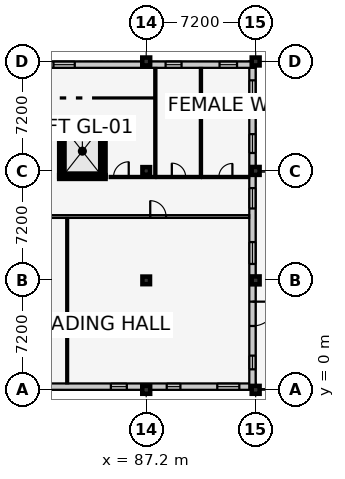
"""IFC4 building model, lengths in metres.
Left out: names, types, materials, properties, quantities, classifications, styles, units other than length and angle.
Written with IfcOpenShell. Run it as: python <this file> out.ifc"""

import sys

from ifc_helpers import new_model, si_unit, direction, frame, frame_2d, origin, origin_2d, place, context, subcontext, project, spatial, rectangle, extrude, element, fill, save


model = new_model("IFC4")
c1 = context("Model", 3, precision=1e-05, world=origin(), true_north=direction((0.0, 1.0)))
c2 = subcontext(c1, "Body", "Model", "MODEL_VIEW")
j1 = project(units=[si_unit("LENGTHUNIT", "METRE"), si_unit("PLANEANGLEUNIT", "RADIAN")], contexts=[c1])
p1 = place(None, origin())
s1 = spatial("IfcSite", under=j1, at=p1, CompositionType="ELEMENT")
p2 = place(p1, origin())
s2 = spatial("IfcBuilding", under=s1, at=p2, CompositionType="ELEMENT")
p3 = place(p2, frame((0.0, 0.0, 18.0)))
s3 = spatial("IfcBuildingStorey", under=s2, at=p3, CompositionType="ELEMENT", Elevation=18.0)
p4 = place(p3, frame((87.2, 0.0, 0.0), z_axis=(0.0, 0.0, 1.0), x_axis=(1.0, 0.0, 0.0)))
e1 = element("IfcColumn", 1, at=p4, inside=s3, PredefinedType="COLUMN", context=c2, shape_type="SweptSolid", body=[
    extrude(rectangle(XDim=0.52, YDim=0.52, at=origin_2d()), origin(), (0.0, 0.0, 1.0), 3.9),
])
for number, where, z_axis, x_axis in (
    (2, (87.2, 7.2, 0.0), (0.0, 0.0, 1.0), (1.0, 0.0, 0.0)),
    (3, (87.2, 14.4, 0.0), (0.0, 0.0, 1.0), (1.0, 0.0, 0.0)),
):
    element("IfcColumn", number, at=place(p3, frame(where, z_axis=z_axis, x_axis=x_axis)), inside=s3, PredefinedType="COLUMN", context=c2, shape_type="SweptSolid", body=[
        extrude(rectangle(XDim=0.5, YDim=0.5, at=origin_2d()), origin(), (0.0, 0.0, 1.0), 3.9),
    ])
for number, where, z_axis, x_axis in (
    (4, (87.2, 21.6, 0.0), (0.0, 0.0, 1.0), (1.0, 0.0, 0.0)),
    (5, (94.4, 0.0, 0.0), (0.0, 0.0, 1.0), (1.0, 0.0, 0.0)),
    (6, (94.4, 7.2, 0.0), (0.0, 0.0, 1.0), (1.0, 0.0, 0.0)),
    (7, (94.4, 14.4, 0.0), (0.0, 0.0, 1.0), (1.0, 0.0, 0.0)),
    (8, (94.4, 21.6, 0.0), (0.0, 0.0, 1.0), (1.0, 0.0, 0.0)),
):
    element("IfcColumn", number, at=place(p3, frame(where, z_axis=z_axis, x_axis=x_axis)), inside=s3, PredefinedType="COLUMN", context=c2, shape_type="SweptSolid", body=[
        extrude(rectangle(XDim=0.52, YDim=0.52, at=origin_2d()), origin(), (0.0, 0.0, 1.0), 3.9),
    ])
p5 = place(p3, frame((94.4, 0.21, 0.0), z_axis=(0.0, 0.0, 1.0), x_axis=(-1.0, 0.0, 0.0)))
e9 = element("IfcWall", 9, at=p5, inside=s3, PredefinedType="SOLIDWALL", context=c2, shape_type="SweptSolid", body=[
    extrude(rectangle(XDim=28.8, YDim=0.42, at=frame_2d((14.4, 0.0))), origin(), (0.0, 0.0, 1.0), 2.955),
])
p6 = place(p5, frame((1.075, 0.0, 0.9)))
e10 = element("IfcOpeningElement", 10, at=p6, cuts=e9, PredefinedType="OPENING", context=c2, shape_type="SweptSolid", body=[
    extrude(rectangle(XDim=1.45, YDim=1.45, at=frame_2d((0.725, 0.725))), frame((0.0, 0.222, 0.0), z_axis=(0.0, -1.0, 0.0), x_axis=(1.0, 0.0, 0.0)), (0.0, 0.0, 1.0), 0.444),
])
p7 = place(p5, frame((4.95, 0.0, 0.9)))
e11 = element("IfcOpeningElement", 11, at=p7, cuts=e9, PredefinedType="OPENING", context=c2, shape_type="SweptSolid", body=[
    extrude(rectangle(XDim=0.9, YDim=1.6, at=frame_2d((0.45, 0.8))), frame((0.0, 0.222, 0.0), z_axis=(0.0, -1.0, 0.0), x_axis=(1.0, 0.0, 0.0)), (0.0, 0.0, 1.0), 0.444),
])
p8 = place(p5, frame((8.475, 0.0, 0.9)))
e12 = element("IfcOpeningElement", 12, at=p8, cuts=e9, PredefinedType="OPENING", context=c2, shape_type="SweptSolid", body=[
    extrude(rectangle(XDim=1.05, YDim=1.6, at=frame_2d((0.525, 0.8))), frame((0.0, 0.222, 0.0), z_axis=(0.0, -1.0, 0.0), x_axis=(1.0, 0.0, 0.0)), (0.0, 0.0, 1.0), 0.444),
])
p9 = place(p5, frame((15.575, 0.0, 0.9)))
e13 = element("IfcOpeningElement", 13, at=p9, cuts=e9, PredefinedType="OPENING", context=c2, shape_type="SweptSolid", body=[
    extrude(rectangle(XDim=1.25, YDim=1.6, at=frame_2d((0.625, 0.8))), frame((0.0, 0.222, 0.0), z_axis=(0.0, -1.0, 0.0), x_axis=(1.0, 0.0, 0.0)), (0.0, 0.0, 1.0), 0.444),
])
p10 = place(p5, frame((19.11, 0.0, 0.9)))
e14 = element("IfcOpeningElement", 14, at=p10, cuts=e9, PredefinedType="OPENING", context=c2, shape_type="SweptSolid", body=[
    extrude(rectangle(XDim=1.38, YDim=1.6, at=frame_2d((0.69, 0.8))), frame((0.0, 0.222, 0.0), z_axis=(0.0, -1.0, 0.0), x_axis=(1.0, 0.0, 0.0)), (0.0, 0.0, 1.0), 0.444),
])
p11 = place(p5, frame((22.65, 0.0, 0.9)))
e15 = element("IfcOpeningElement", 15, at=p11, cuts=e9, PredefinedType="OPENING", context=c2, shape_type="SweptSolid", body=[
    extrude(rectangle(XDim=1.5, YDim=1.6, at=frame_2d((0.75, 0.8))), frame((0.0, 0.222, 0.0), z_axis=(0.0, -1.0, 0.0), x_axis=(1.0, 0.0, 0.0)), (0.0, 0.0, 1.0), 0.444),
])
p12 = place(p5, frame((26.5, 0.0, 0.9)))
e16 = element("IfcOpeningElement", 16, at=p12, cuts=e9, PredefinedType="OPENING", context=c2, shape_type="SweptSolid", body=[
    extrude(rectangle(XDim=1.0, YDim=1.75, at=frame_2d((0.5, 0.875))), frame((0.0, 0.222, 0.0), z_axis=(0.0, -1.0, 0.0), x_axis=(1.0, 0.0, 0.0)), (0.0, 0.0, 1.0), 0.444),
])
p13 = place(p3, frame((94.19, 21.6, 0.0), z_axis=(0.0, 0.0, 1.0), x_axis=(0.0, -1.0, 0.0)))
e17 = element("IfcWall", 17, at=p13, inside=s3, PredefinedType="SOLIDWALL", context=c2, shape_type="SweptSolid", body=[
    extrude(rectangle(XDim=21.6, YDim=0.42, at=frame_2d((10.8, 0.0))), origin(), (0.0, 0.0, 1.0), 3.055),
])
p14 = place(p13, frame((15.8, 0.0, 0.0)))
e18 = element("IfcOpeningElement", 18, at=p14, cuts=e17, PredefinedType="OPENING", context=c2, shape_type="SweptSolid", body=[
    extrude(rectangle(XDim=1.6, YDim=2.2, at=frame_2d((0.8, 1.1))), frame((0.0, 0.222, 0.0), z_axis=(0.0, -1.0, 0.0), x_axis=(1.0, 0.0, 0.0)), (0.0, 0.0, 1.0), 0.444),
])
p15 = place(p13, frame((1.24, 0.0, 0.9)))
e19 = element("IfcOpeningElement", 19, at=p15, cuts=e17, PredefinedType="OPENING", context=c2, shape_type="SweptSolid", body=[
    extrude(rectangle(XDim=1.12, YDim=1.75, at=frame_2d((0.56, 0.875))), frame((0.0, 0.222, 0.0), z_axis=(0.0, -1.0, 0.0), x_axis=(1.0, 0.0, 0.0)), (0.0, 0.0, 1.0), 0.444),
])
p16 = place(p13, frame((4.78, 0.0, 0.9)))
e20 = element("IfcOpeningElement", 20, at=p16, cuts=e17, PredefinedType="OPENING", context=c2, shape_type="SweptSolid", body=[
    extrude(rectangle(XDim=1.24, YDim=1.75, at=frame_2d((0.62, 0.875))), frame((0.0, 0.222, 0.0), z_axis=(0.0, -1.0, 0.0), x_axis=(1.0, 0.0, 0.0)), (0.0, 0.0, 1.0), 0.444),
])
p17 = place(p13, frame((8.33, 0.0, 0.9)))
e21 = element("IfcOpeningElement", 21, at=p17, cuts=e17, PredefinedType="OPENING", context=c2, shape_type="SweptSolid", body=[
    extrude(rectangle(XDim=1.34, YDim=1.75, at=frame_2d((0.67, 0.875))), frame((0.0, 0.222, 0.0), z_axis=(0.0, -1.0, 0.0), x_axis=(1.0, 0.0, 0.0)), (0.0, 0.0, 1.0), 0.444),
])
p18 = place(p13, frame((11.88, 0.0, 0.9)))
e22 = element("IfcOpeningElement", 22, at=p18, cuts=e17, PredefinedType="OPENING", context=c2, shape_type="SweptSolid", body=[
    extrude(rectangle(XDim=1.44, YDim=1.75, at=frame_2d((0.72, 0.875))), frame((0.0, 0.222, 0.0), z_axis=(0.0, -1.0, 0.0), x_axis=(1.0, 0.0, 0.0)), (0.0, 0.0, 1.0), 0.444),
])
p19 = place(p13, frame((19.35, 0.0, 0.9)))
e23 = element("IfcOpeningElement", 23, at=p19, cuts=e17, PredefinedType="OPENING", context=c2, shape_type="SweptSolid", body=[
    extrude(rectangle(XDim=0.9, YDim=1.35, at=frame_2d((0.45, 0.675))), frame((0.0, 0.222, 0.0), z_axis=(0.0, -1.0, 0.0), x_axis=(1.0, 0.0, 0.0)), (0.0, 0.0, 1.0), 0.444),
])
p20 = place(p3, frame((65.6, 21.39, 0.0), z_axis=(0.0, 0.0, 1.0), x_axis=(1.0, 0.0, 0.0)))
e24 = element("IfcWall", 24, at=p20, inside=s3, PredefinedType="SOLIDWALL", context=c2, shape_type="SweptSolid", body=[
    extrude(rectangle(XDim=28.8, YDim=0.42, at=frame_2d((14.4, 0.0))), origin(), (0.0, 0.0, 1.0), 2.955),
])
p21 = place(p20, frame((1.3, 0.0, 0.9)))
e25 = element("IfcOpeningElement", 25, at=p21, cuts=e24, PredefinedType="OPENING", context=c2, shape_type="SweptSolid", body=[
    extrude(rectangle(XDim=1.0, YDim=1.35, at=frame_2d((0.5, 0.675))), frame((0.0, 0.222, 0.0), z_axis=(0.0, -1.0, 0.0), x_axis=(1.0, 0.0, 0.0)), (0.0, 0.0, 1.0), 0.444),
])
p22 = place(p20, frame((8.4, 0.0, 0.9)))
e26 = element("IfcOpeningElement", 26, at=p22, cuts=e24, PredefinedType="OPENING", context=c2, shape_type="SweptSolid", body=[
    extrude(rectangle(XDim=1.2, YDim=1.35, at=frame_2d((0.6, 0.675))), frame((0.0, 0.222, 0.0), z_axis=(0.0, -1.0, 0.0), x_axis=(1.0, 0.0, 0.0)), (0.0, 0.0, 1.0), 0.444),
])
p23 = place(p20, frame((11.95, 0.0, 0.9)))
e27 = element("IfcOpeningElement", 27, at=p23, cuts=e24, PredefinedType="OPENING", context=c2, shape_type="SweptSolid", body=[
    extrude(rectangle(XDim=1.3, YDim=1.35, at=frame_2d((0.65, 0.675))), frame((0.0, 0.222, 0.0), z_axis=(0.0, -1.0, 0.0), x_axis=(1.0, 0.0, 0.0)), (0.0, 0.0, 1.0), 0.444),
])
p24 = place(p20, frame((15.5, 0.0, 0.9)))
e28 = element("IfcOpeningElement", 28, at=p24, cuts=e24, PredefinedType="OPENING", context=c2, shape_type="SweptSolid", body=[
    extrude(rectangle(XDim=1.4, YDim=1.35, at=frame_2d((0.7, 0.675))), frame((0.0, 0.222, 0.0), z_axis=(0.0, -1.0, 0.0), x_axis=(1.0, 0.0, 0.0)), (0.0, 0.0, 1.0), 0.444),
])
p25 = place(p20, frame((22.875, 0.0, 0.9)))
e29 = element("IfcOpeningElement", 29, at=p25, cuts=e24, PredefinedType="OPENING", context=c2, shape_type="SweptSolid", body=[
    extrude(rectangle(XDim=1.05, YDim=1.45, at=frame_2d((0.525, 0.725))), frame((0.0, 0.222, 0.0), z_axis=(0.0, -1.0, 0.0), x_axis=(1.0, 0.0, 0.0)), (0.0, 0.0, 1.0), 0.444),
])
p26 = place(p20, frame((26.425, 0.0, 0.9)))
e30 = element("IfcOpeningElement", 30, at=p26, cuts=e24, PredefinedType="OPENING", context=c2, shape_type="SweptSolid", body=[
    extrude(rectangle(XDim=1.15, YDim=1.45, at=frame_2d((0.575, 0.725))), frame((0.0, 0.222, 0.0), z_axis=(0.0, -1.0, 0.0), x_axis=(1.0, 0.0, 0.0)), (0.0, 0.0, 1.0), 0.444),
])
p27 = place(p3, frame((81.475, 14.0, 0.0), z_axis=(0.0, 0.0, 1.0), x_axis=(1.0, 0.0, 0.0)))
e31 = element("IfcWall", 31, at=p27, inside=s3, PredefinedType="SHEAR", context=c2, shape_type="SweptSolid", body=[
    extrude(rectangle(XDim=3.05, YDim=0.25, at=frame_2d((1.525, 0.0))), origin(), (0.0, 0.0, 1.0), 3.66),
])
p28 = place(p27, frame((0.725, 0.0, 0.0)))
e32 = element("IfcOpeningElement", 32, at=p28, cuts=e31, PredefinedType="OPENING", context=c2, shape_type="SweptSolid", body=[
    extrude(rectangle(XDim=1.6, YDim=2.3, at=frame_2d((0.8, 1.15))), frame((0.0, 0.137, 0.0), z_axis=(0.0, -1.0, 0.0), x_axis=(1.0, 0.0, 0.0)), (0.0, 0.0, 1.0), 0.274),
])
p29 = place(p3, frame((84.525, 17.4, 0.0), z_axis=(0.0, 0.0, 1.0), x_axis=(-1.0, 0.0, 0.0)))
e33 = element("IfcWall", 33, at=p29, inside=s3, PredefinedType="SHEAR", context=c2, shape_type="SweptSolid", body=[
    extrude(rectangle(XDim=3.05, YDim=0.25, at=frame_2d((1.525, 0.0))), origin(), (0.0, 0.0, 1.0), 3.66),
])
for number, where, z_axis, x_axis in (
    (34, (81.6, 17.4, 0.0), (0.0, 0.0, 1.0), (0.0, -1.0, 0.0)),
    (35, (84.4, 14.0, 0.0), (0.0, 0.0, 1.0), (0.0, 1.0, 0.0)),
):
    element("IfcWall", number, at=place(p3, frame(where, z_axis=z_axis, x_axis=x_axis)), inside=s3, PredefinedType="SHEAR", context=c2, shape_type="SweptSolid", body=[
        extrude(rectangle(XDim=3.4, YDim=0.25, at=frame_2d((1.7, 0.0))), origin(), (0.0, 0.0, 1.0), 3.66),
    ])
p30 = place(p3, frame((66.03, 11.4, 0.0), z_axis=(0.0, 0.0, 1.0), x_axis=(1.0, 0.0, 0.0)))
e36 = element("IfcWall", 36, at=p30, inside=s3, PredefinedType="PARTITIONING", context=c2, shape_type="SweptSolid", body=[
    extrude(rectangle(XDim=27.94, YDim=0.18, at=frame_2d((13.97, 0.0))), origin(), (0.0, 0.0, 1.0), 3.66),
])
p31 = place(p30, frame((7.445, 0.0, 0.0)))
e37 = element("IfcOpeningElement", 37, at=p31, cuts=e36, PredefinedType="OPENING", context=c2, shape_type="SweptSolid", body=[
    extrude(rectangle(XDim=1.08, YDim=2.15, at=frame_2d((0.54, 1.075))), frame((0.0, 0.102, 0.0), z_axis=(0.0, -1.0, 0.0), x_axis=(1.0, 0.0, 0.0)), (0.0, 0.0, 1.0), 0.204),
])
p32 = place(p30, frame((21.435, 0.0, 0.0)))
e38 = element("IfcOpeningElement", 38, at=p32, cuts=e36, PredefinedType="OPENING", context=c2, shape_type="SweptSolid", body=[
    extrude(rectangle(XDim=1.04, YDim=2.15, at=frame_2d((0.52, 1.075))), frame((0.0, 0.102, 0.0), z_axis=(0.0, -1.0, 0.0), x_axis=(1.0, 0.0, 0.0)), (0.0, 0.0, 1.0), 0.204),
])
p33 = place(p3, frame((82.0, 0.43, 0.0), z_axis=(0.0, 0.0, 1.0), x_axis=(0.0, 1.0, 0.0)))
e39 = element("IfcWall", 39, at=p33, inside=s3, PredefinedType="PARTITIONING", context=c2, shape_type="SweptSolid", body=[
    extrude(rectangle(XDim=10.87, YDim=0.125, at=frame_2d((5.435, 0.0))), origin(), (0.0, 0.0, 1.0), 3.66),
])
p34 = place(p3, frame((84.8, 14.0, 0.0), z_axis=(0.0, 0.0, 1.0), x_axis=(1.0, 0.0, 0.0)))
e40 = element("IfcWall", 40, at=p34, inside=s3, PredefinedType="PARTITIONING", context=c2, shape_type="SweptSolid", body=[
    extrude(rectangle(XDim=3.0, YDim=0.14, at=frame_2d((1.5, 0.0))), origin(), (0.0, 0.0, 1.0), 3.66),
])
p35 = place(p34, frame((0.25, 0.0, 0.0)))
e41 = element("IfcOpeningElement", 41, at=p35, cuts=e40, PredefinedType="OPENING", context=c2, shape_type="SweptSolid", body=[
    extrude(rectangle(XDim=1.0, YDim=2.1, at=frame_2d((0.5, 1.05))), frame((0.0, 0.082, 0.0), z_axis=(0.0, -1.0, 0.0), x_axis=(1.0, 0.0, 0.0)), (0.0, 0.0, 1.0), 0.164),
])
p36 = place(p3, frame((87.8, 14.08, 0.0), z_axis=(0.0, 0.0, 1.0), x_axis=(0.0, 1.0, 0.0)))
e42 = element("IfcWall", 42, at=p36, inside=s3, PredefinedType="PARTITIONING", context=c2, shape_type="SweptSolid", body=[
    extrude(rectangle(XDim=7.09, YDim=0.14, at=frame_2d((3.545, 0.0))), origin(), (0.0, 0.0, 1.0), 3.66),
])
p37 = place(p3, frame((87.88, 14.0, 0.0), z_axis=(0.0, 0.0, 1.0), x_axis=(1.0, 0.0, 0.0)))
e43 = element("IfcWall", 43, at=p37, inside=s3, PredefinedType="PARTITIONING", context=c2, shape_type="SweptSolid", body=[
    extrude(rectangle(XDim=2.92, YDim=0.14, at=frame_2d((1.46, 0.0))), origin(), (0.0, 0.0, 1.0), 3.66),
])
p38 = place(p37, frame((1.005, 0.0, 0.0)))
e44 = element("IfcOpeningElement", 44, at=p38, cuts=e43, PredefinedType="OPENING", context=c2, shape_type="SweptSolid", body=[
    extrude(rectangle(XDim=0.91, YDim=2.06, at=frame_2d((0.455, 1.03))), frame((0.0, 0.082, 0.0), z_axis=(0.0, -1.0, 0.0), x_axis=(1.0, 0.0, 0.0)), (0.0, 0.0, 1.0), 0.164),
])
p39 = place(p3, frame((90.8, 14.08, 0.0), z_axis=(0.0, 0.0, 1.0), x_axis=(0.0, 1.0, 0.0)))
e45 = element("IfcWall", 45, at=p39, inside=s3, PredefinedType="PARTITIONING", context=c2, shape_type="SweptSolid", body=[
    extrude(rectangle(XDim=7.09, YDim=0.14, at=frame_2d((3.545, 0.0))), origin(), (0.0, 0.0, 1.0), 3.275),
])
p40 = place(p3, frame((90.88, 14.0, 0.0), z_axis=(0.0, 0.0, 1.0), x_axis=(1.0, 0.0, 0.0)))
e46 = element("IfcWall", 46, at=p40, inside=s3, PredefinedType="PARTITIONING", context=c2, shape_type="SweptSolid", body=[
    extrude(rectangle(XDim=3.09, YDim=0.14, at=frame_2d((1.545, 0.0))), origin(), (0.0, 0.0, 1.0), 3.66),
])
p41 = place(p40, frame((1.1, 0.0, 0.0)))
e47 = element("IfcOpeningElement", 47, at=p41, cuts=e46, PredefinedType="OPENING", context=c2, shape_type="SweptSolid", body=[
    extrude(rectangle(XDim=0.89, YDim=2.05, at=frame_2d((0.445, 1.025))), frame((0.0, 0.082, 0.0), z_axis=(0.0, -1.0, 0.0), x_axis=(1.0, 0.0, 0.0)), (0.0, 0.0, 1.0), 0.164),
])
p42 = place(p6, origin())
e48 = element("IfcWindow", 48, at=p42, inside=s3, PartitioningType="SINGLE_PANEL", PredefinedType="WINDOW", context=c2, shape_type="SweptSolid", body=[
    extrude(rectangle(XDim=1.45, YDim=1.45, at=frame_2d((0.725, 0.725))), frame((0.0, 0.03, 0.0), z_axis=(0.0, -1.0, 0.0), x_axis=(1.0, 0.0, 0.0)), (0.0, 0.0, 1.0), 0.06),
])
fill(e10, e48)
p43 = place(p7, origin())
e49 = element("IfcWindow", 49, at=p43, inside=s3, PartitioningType="SINGLE_PANEL", PredefinedType="WINDOW", context=c2, shape_type="SweptSolid", body=[
    extrude(rectangle(XDim=0.9, YDim=1.6, at=frame_2d((0.45, 0.8))), frame((0.0, 0.03, 0.0), z_axis=(0.0, -1.0, 0.0), x_axis=(1.0, 0.0, 0.0)), (0.0, 0.0, 1.0), 0.06),
])
fill(e11, e49)
p44 = place(p8, origin())
e50 = element("IfcWindow", 50, at=p44, inside=s3, PartitioningType="SINGLE_PANEL", PredefinedType="WINDOW", context=c2, shape_type="SweptSolid", body=[
    extrude(rectangle(XDim=1.05, YDim=1.6, at=frame_2d((0.525, 0.8))), frame((0.0, 0.03, 0.0), z_axis=(0.0, -1.0, 0.0), x_axis=(1.0, 0.0, 0.0)), (0.0, 0.0, 1.0), 0.06),
])
fill(e12, e50)
p45 = place(p14, origin())
e51 = element("IfcDoor", 51, at=p45, inside=s3, OperationType="SINGLE_SWING_LEFT", PredefinedType="DOOR", context=c2, shape_type="SweptSolid", body=[
    extrude(rectangle(XDim=1.6, YDim=2.2, at=frame_2d((0.8, 1.1))), frame((0.0, 0.025, 0.0), z_axis=(0.0, -1.0, 0.0), x_axis=(1.0, 0.0, 0.0)), (0.0, 0.0, 1.0), 0.05),
])
fill(e18, e51)
p46 = place(p15, origin())
e52 = element("IfcWindow", 52, at=p46, inside=s3, PartitioningType="SINGLE_PANEL", PredefinedType="WINDOW", context=c2, shape_type="SweptSolid", body=[
    extrude(rectangle(XDim=1.12, YDim=1.75, at=frame_2d((0.56, 0.875))), frame((0.0, 0.03, 0.0), z_axis=(0.0, -1.0, 0.0), x_axis=(1.0, 0.0, 0.0)), (0.0, 0.0, 1.0), 0.06),
])
fill(e19, e52)
p47 = place(p16, origin())
e53 = element("IfcWindow", 53, at=p47, inside=s3, PartitioningType="SINGLE_PANEL", PredefinedType="WINDOW", context=c2, shape_type="SweptSolid", body=[
    extrude(rectangle(XDim=1.24, YDim=1.75, at=frame_2d((0.62, 0.875))), frame((0.0, 0.03, 0.0), z_axis=(0.0, -1.0, 0.0), x_axis=(1.0, 0.0, 0.0)), (0.0, 0.0, 1.0), 0.06),
])
fill(e20, e53)
p48 = place(p17, origin())
e54 = element("IfcWindow", 54, at=p48, inside=s3, PartitioningType="SINGLE_PANEL", PredefinedType="WINDOW", context=c2, shape_type="SweptSolid", body=[
    extrude(rectangle(XDim=1.34, YDim=1.75, at=frame_2d((0.67, 0.875))), frame((0.0, 0.03, 0.0), z_axis=(0.0, -1.0, 0.0), x_axis=(1.0, 0.0, 0.0)), (0.0, 0.0, 1.0), 0.06),
])
fill(e21, e54)
p49 = place(p18, origin())
e55 = element("IfcWindow", 55, at=p49, inside=s3, PartitioningType="SINGLE_PANEL", PredefinedType="WINDOW", context=c2, shape_type="SweptSolid", body=[
    extrude(rectangle(XDim=1.44, YDim=1.75, at=frame_2d((0.72, 0.875))), frame((0.0, 0.03, 0.0), z_axis=(0.0, -1.0, 0.0), x_axis=(1.0, 0.0, 0.0)), (0.0, 0.0, 1.0), 0.06),
])
fill(e22, e55)
p50 = place(p19, origin())
e56 = element("IfcWindow", 56, at=p50, inside=s3, PartitioningType="SINGLE_PANEL", PredefinedType="WINDOW", context=c2, shape_type="SweptSolid", body=[
    extrude(rectangle(XDim=0.9, YDim=1.35, at=frame_2d((0.45, 0.675))), frame((0.0, 0.03, 0.0), z_axis=(0.0, -1.0, 0.0), x_axis=(1.0, 0.0, 0.0)), (0.0, 0.0, 1.0), 0.06),
])
fill(e23, e56)
p51 = place(p24, origin())
e57 = element("IfcWindow", 57, at=p51, inside=s3, PartitioningType="SINGLE_PANEL", PredefinedType="WINDOW", context=c2, shape_type="SweptSolid", body=[
    extrude(rectangle(XDim=1.4, YDim=1.35, at=frame_2d((0.7, 0.675))), frame((0.0, 0.03, 0.0), z_axis=(0.0, -1.0, 0.0), x_axis=(1.0, 0.0, 0.0)), (0.0, 0.0, 1.0), 0.06),
])
fill(e28, e57)
p52 = place(p25, origin())
e58 = element("IfcWindow", 58, at=p52, inside=s3, PartitioningType="SINGLE_PANEL", PredefinedType="WINDOW", context=c2, shape_type="SweptSolid", body=[
    extrude(rectangle(XDim=1.05, YDim=1.45, at=frame_2d((0.525, 0.725))), frame((0.0, 0.03, 0.0), z_axis=(0.0, -1.0, 0.0), x_axis=(1.0, 0.0, 0.0)), (0.0, 0.0, 1.0), 0.06),
])
fill(e29, e58)
p53 = place(p26, origin())
e59 = element("IfcWindow", 59, at=p53, inside=s3, PartitioningType="SINGLE_PANEL", PredefinedType="WINDOW", context=c2, shape_type="SweptSolid", body=[
    extrude(rectangle(XDim=1.15, YDim=1.45, at=frame_2d((0.575, 0.725))), frame((0.0, 0.03, 0.0), z_axis=(0.0, -1.0, 0.0), x_axis=(1.0, 0.0, 0.0)), (0.0, 0.0, 1.0), 0.06),
])
fill(e30, e59)
p54 = place(p28, origin())
e60 = element("IfcDoor", 60, at=p54, inside=s3, OperationType="DOUBLE_DOOR_SLIDING", PredefinedType="DOOR", context=c2, shape_type="SweptSolid", body=[
    extrude(rectangle(XDim=1.6, YDim=2.3, at=frame_2d((0.8, 1.15))), frame((0.0, 0.025, 0.0), z_axis=(0.0, -1.0, 0.0), x_axis=(1.0, 0.0, 0.0)), (0.0, 0.0, 1.0), 0.05),
])
fill(e32, e60)
p55 = place(p32, origin())
e61 = element("IfcDoor", 61, at=p55, inside=s3, OperationType="SINGLE_SWING_LEFT", PredefinedType="DOOR", context=c2, shape_type="SweptSolid", body=[
    extrude(rectangle(XDim=1.04, YDim=2.15, at=frame_2d((0.52, 1.075))), frame((0.0, 0.025, 0.0), z_axis=(0.0, -1.0, 0.0), x_axis=(1.0, 0.0, 0.0)), (0.0, 0.0, 1.0), 0.05),
])
fill(e38, e61)
p56 = place(p35, origin())
e62 = element("IfcDoor", 62, at=p56, inside=s3, OperationType="SINGLE_SWING_RIGHT", PredefinedType="DOOR", context=c2, shape_type="SweptSolid", body=[
    extrude(rectangle(XDim=1.0, YDim=2.1, at=frame_2d((0.5, 1.05))), frame((0.0, 0.025, 0.0), z_axis=(0.0, -1.0, 0.0), x_axis=(1.0, 0.0, 0.0)), (0.0, 0.0, 1.0), 0.05),
])
fill(e41, e62)
p57 = place(p38, origin())
e63 = element("IfcDoor", 63, at=p57, inside=s3, OperationType="SINGLE_SWING_LEFT", PredefinedType="DOOR", context=c2, shape_type="SweptSolid", body=[
    extrude(rectangle(XDim=0.91, YDim=2.06, at=frame_2d((0.455, 1.03))), frame((0.0, 0.025, 0.0), z_axis=(0.0, -1.0, 0.0), x_axis=(1.0, 0.0, 0.0)), (0.0, 0.0, 1.0), 0.05),
])
fill(e44, e63)
p58 = place(p41, origin())
e64 = element("IfcDoor", 64, at=p58, inside=s3, OperationType="SINGLE_SWING_RIGHT", PredefinedType="DOOR", context=c2, shape_type="SweptSolid", body=[
    extrude(rectangle(XDim=0.89, YDim=2.05, at=frame_2d((0.445, 1.025))), frame((0.0, 0.025, 0.0), z_axis=(0.0, -1.0, 0.0), x_axis=(1.0, 0.0, 0.0)), (0.0, 0.0, 1.0), 0.05),
])
fill(e47, e64)
save(model, sys.argv[1])
